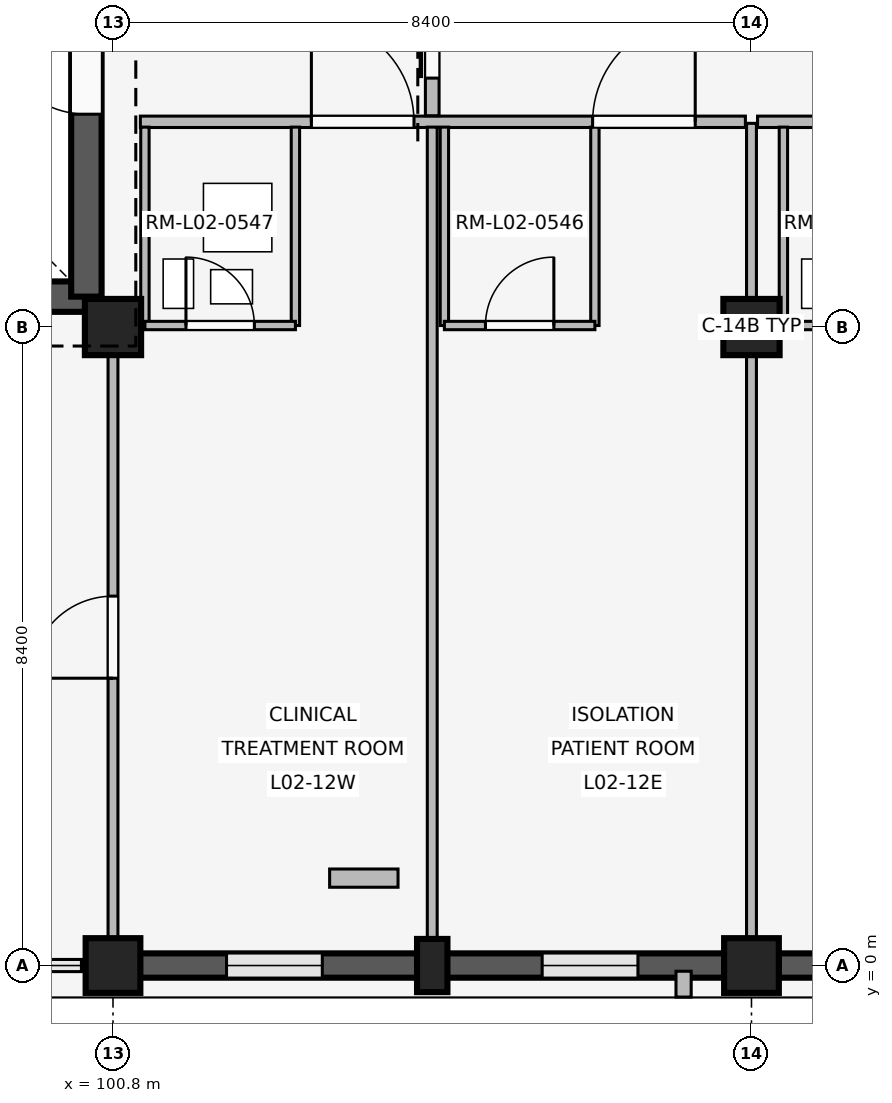
"""IFC4 building model, lengths in metres.
Left out: names, types, materials, properties, quantities, classifications, styles, units other than length and angle.
Written with IfcOpenShell. Run it as: python <this file> out.ifc"""

import sys

from ifc_helpers import new_model, si_unit, direction, frame, frame_2d, origin, origin_2d, place, context, subcontext, project, spatial, rectangle, extrude, element, fill, save


model = new_model("IFC4")
c1 = context("Model", 3, precision=1e-05, world=origin(), true_north=direction((0.0, 1.0)))
c2 = subcontext(c1, "Body", "Model", "MODEL_VIEW")
j1 = project(units=[si_unit("LENGTHUNIT", "METRE"), si_unit("PLANEANGLEUNIT", "RADIAN")], contexts=[c1])
p1 = place(None, origin())
s1 = spatial("IfcSite", under=j1, at=p1, CompositionType="ELEMENT")
p2 = place(p1, origin())
s2 = spatial("IfcBuilding", under=s1, at=p2, CompositionType="ELEMENT")
p3 = place(p2, frame((0.0, 0.0, 8.1)))
s3 = spatial("IfcBuildingStorey", under=s2, at=p3, CompositionType="ELEMENT", Elevation=8.1)
p4 = place(p3, frame((100.8, 0.0, 0.0), z_axis=(0.0, 0.0, 1.0), x_axis=(1.0, 0.0, 0.0)))
e1 = element("IfcColumn", 1, at=p4, inside=s3, PredefinedType="COLUMN", context=c2, shape_type="SweptSolid", body=[
    extrude(rectangle(XDim=0.72, YDim=0.72, at=origin_2d()), origin(), (0.0, 0.0, 1.0), 4.8),
])
p5 = place(p3, frame((100.8, 8.4, 0.0), z_axis=(0.0, 0.0, 1.0), x_axis=(1.0, 0.0, 0.0)))
e2 = element("IfcColumn", 2, at=p5, inside=s3, PredefinedType="COLUMN", context=c2, shape_type="SweptSolid", body=[
    extrude(rectangle(XDim=0.74, YDim=0.74, at=origin_2d()), origin(), (0.0, 0.0, 1.0), 4.8),
])
p6 = place(p3, frame((109.2, 0.0, 0.0), z_axis=(0.0, 0.0, 1.0), x_axis=(1.0, 0.0, 0.0)))
e3 = element("IfcColumn", 3, at=p6, inside=s3, PredefinedType="COLUMN", context=c2, shape_type="SweptSolid", body=[
    extrude(rectangle(XDim=0.72, YDim=0.72, at=origin_2d()), origin(), (0.0, 0.0, 1.0), 4.8),
])
p7 = place(p3, frame((109.2, 8.4, 0.0), z_axis=(0.0, 0.0, 1.0), x_axis=(1.0, 0.0, 0.0)))
e4 = element("IfcColumn", 4, at=p7, inside=s3, PredefinedType="COLUMN", context=c2, shape_type="SweptSolid", body=[
    extrude(rectangle(XDim=0.74, YDim=0.74, at=origin_2d()), origin(), (0.0, 0.0, 1.0), 4.8),
])
p8 = place(p3, frame((105.0, 0.0, 0.0), z_axis=(0.0, 0.0, 1.0), x_axis=(1.0, 0.0, 0.0)))
e5 = element("IfcColumn", 5, at=p8, inside=s3, PredefinedType="PILASTER", context=c2, shape_type="SweptSolid", body=[
    extrude(rectangle(XDim=0.4, YDim=0.7, at=origin_2d()), origin(), (0.0, 0.0, 1.0), 4.8),
])
p9 = place(p3, frame((108.845, 0.0, 0.0), z_axis=(0.0, 0.0, 1.0), x_axis=(-1.0, 0.0, 0.0)))
e6 = element("IfcWall", 6, at=p9, inside=s3, PredefinedType="SOLIDWALL", context=c2, shape_type="SweptSolid", body=[
    extrude(rectangle(XDim=7.69, YDim=0.32, at=frame_2d((3.845, 0.0))), origin(), (0.0, 0.0, 1.0), 3.86),
])
p10 = place(p9, frame((1.139, 0.0, 0.85)))
e7 = element("IfcOpeningElement", 7, at=p10, cuts=e6, PredefinedType="OPENING", context=c2, shape_type="SweptSolid", body=[
    extrude(rectangle(XDim=1.26, YDim=1.52, at=frame_2d((0.63, 0.76))), frame((0.0, 0.17, 0.0), z_axis=(0.0, -1.0, 0.0), x_axis=(1.0, 0.0, 0.0)), (0.0, 0.0, 1.0), 0.34),
])
p11 = place(p9, frame((5.291, 0.0, 0.85)))
e8 = element("IfcOpeningElement", 8, at=p11, cuts=e6, PredefinedType="OPENING", context=c2, shape_type="SweptSolid", body=[
    extrude(rectangle(XDim=1.26, YDim=1.52, at=frame_2d((0.63, 0.76))), frame((0.0, 0.17, 0.0), z_axis=(0.0, -1.0, 0.0), x_axis=(1.0, 0.0, 0.0)), (0.0, 0.0, 1.0), 0.34),
])
p12 = place(p3, frame((108.307, -0.075, 0.0), z_axis=(0.0, 0.0, 1.0), x_axis=(0.0, -1.0, 0.0)))
e9 = element("IfcWall", 9, at=p12, inside=s3, PredefinedType="ELEMENTEDWALL", context=c2, shape_type="SweptSolid", body=[
    extrude(rectangle(XDim=0.34, YDim=0.2, at=frame_2d((0.17, 0.0))), origin(), (0.0, 0.0, 1.0), 3.84),
])
p13 = place(p3, frame((117.245, 0.0, 0.0), z_axis=(0.0, 0.0, 1.0), x_axis=(-1.0, 0.0, 0.0)))
e10 = element("IfcWall", 10, at=p13, inside=s3, PredefinedType="SOLIDWALL", context=c2, shape_type="SweptSolid", body=[
    extrude(rectangle(XDim=7.69, YDim=0.32, at=frame_2d((3.845, 0.0))), origin(), (0.0, 0.0, 1.0), 3.86),
])
p14 = place(p13, frame((1.189, 0.0, 0.85)))
e11 = element("IfcOpeningElement", 11, at=p14, cuts=e10, PredefinedType="OPENING", context=c2, shape_type="SweptSolid", body=[
    extrude(rectangle(XDim=1.16, YDim=1.48, at=frame_2d((0.58, 0.74))), frame((0.0, 0.17, 0.0), z_axis=(0.0, -1.0, 0.0), x_axis=(1.0, 0.0, 0.0)), (0.0, 0.0, 1.0), 0.34),
])
p15 = place(p13, frame((5.341, 0.0, 0.85)))
e12 = element("IfcOpeningElement", 12, at=p15, cuts=e10, PredefinedType="OPENING", context=c2, shape_type="SweptSolid", body=[
    extrude(rectangle(XDim=1.16, YDim=1.48, at=frame_2d((0.58, 0.74))), frame((0.0, 0.17, 0.0), z_axis=(0.0, -1.0, 0.0), x_axis=(1.0, 0.0, 0.0)), (0.0, 0.0, 1.0), 0.34),
])
p16 = place(p3, frame((92.95, 8.8, 0.0), z_axis=(0.0, 0.0, 1.0), x_axis=(1.0, 0.0, 0.0)))
e13 = element("IfcWall", 13, at=p16, inside=s3, PredefinedType="SHEAR", context=c2, shape_type="SweptSolid", body=[
    extrude(rectangle(XDim=7.5, YDim=0.4, at=frame_2d((3.75, 0.0))), origin(), (0.0, 0.0, 1.0), 4.52),
])
p17 = place(p16, frame((4.85, 0.0, 0.0)))
e14 = element("IfcOpeningElement", 14, at=p17, cuts=e13, PredefinedType="OPENING", context=c2, shape_type="SweptSolid", body=[
    extrude(rectangle(XDim=1.2, YDim=2.2, at=frame_2d((0.6, 1.1))), frame((0.0, 0.21, 0.0), z_axis=(0.0, -1.0, 0.0), x_axis=(1.0, 0.0, 0.0)), (0.0, 0.0, 1.0), 0.42),
])
p18 = place(p3, frame((100.45, 8.8, 0.0), z_axis=(0.0, 0.0, 1.0), x_axis=(0.0, 1.0, 0.0)))
e15 = element("IfcWall", 15, at=p18, inside=s3, PredefinedType="SHEAR", context=c2, shape_type="SweptSolid", body=[
    extrude(rectangle(XDim=7.55, YDim=0.4, at=frame_2d((3.775, 0.0))), origin(), (0.0, 0.0, 1.0), 4.52),
])
p19 = place(p18, frame((2.4, 0.0, 0.0)))
e16 = element("IfcOpeningElement", 16, at=p19, cuts=e15, PredefinedType="OPENING", context=c2, shape_type="SweptSolid", body=[
    extrude(rectangle(XDim=1.2, YDim=2.2, at=frame_2d((0.6, 1.1))), frame((0.0, 0.21, 0.0), z_axis=(0.0, -1.0, 0.0), x_axis=(1.0, 0.0, 0.0)), (0.0, 0.0, 1.0), 0.42),
])
p20 = place(p3, frame((100.8, 0.14, 0.0), z_axis=(0.0, 0.0, 1.0), x_axis=(0.0, 1.0, 0.0)))
e17 = element("IfcWall", 17, at=p20, inside=s3, PredefinedType="PARTITIONING", context=c2, shape_type="SweptSolid", body=[
    extrude(rectangle(XDim=8.21, YDim=0.13, at=frame_2d((4.105, 0.0))), origin(), (0.0, 0.0, 1.0), 3.84),
])
p21 = place(p20, frame((3.64, 0.0, 0.0)))
e18 = element("IfcOpeningElement", 18, at=p21, cuts=e17, PredefinedType="OPENING", context=c2, shape_type="SweptSolid", body=[
    extrude(rectangle(XDim=1.08, YDim=2.15, at=frame_2d((0.54, 1.075))), frame((0.0, 0.075, 0.0), z_axis=(0.0, -1.0, 0.0), x_axis=(1.0, 0.0, 0.0)), (0.0, 0.0, 1.0), 0.15),
])
p22 = place(p3, frame((101.16, 11.1, 0.0), z_axis=(0.0, 0.0, 1.0), x_axis=(1.0, 0.0, 0.0)))
e19 = element("IfcWall", 19, at=p22, inside=s3, PredefinedType="PARTITIONING", context=c2, shape_type="SweptSolid", body=[
    extrude(rectangle(XDim=7.96, YDim=0.15, at=frame_2d((3.98, 0.0))), origin(), (0.0, 0.0, 1.0), 3.84),
])
p23 = place(p22, frame((2.25, 0.0, 0.0)))
e20 = element("IfcOpeningElement", 20, at=p23, cuts=e19, PredefinedType="OPENING", context=c2, shape_type="SweptSolid", body=[
    extrude(rectangle(XDim=1.35, YDim=2.25, at=frame_2d((0.675, 1.125))), frame((0.0, 0.085, 0.0), z_axis=(0.0, -1.0, 0.0), x_axis=(1.0, 0.0, 0.0)), (0.0, 0.0, 1.0), 0.17),
])
p24 = place(p22, frame((5.95, 0.0, 0.0)))
e21 = element("IfcOpeningElement", 21, at=p24, cuts=e19, PredefinedType="OPENING", context=c2, shape_type="SweptSolid", body=[
    extrude(rectangle(XDim=1.35, YDim=2.25, at=frame_2d((0.675, 1.125))), frame((0.0, 0.085, 0.0), z_axis=(0.0, -1.0, 0.0), x_axis=(1.0, 0.0, 0.0)), (0.0, 0.0, 1.0), 0.17),
])
p25 = place(p3, frame((105.0, 0.1, 0.0), z_axis=(0.0, 0.0, 1.0), x_axis=(0.0, 1.0, 0.0)))
e22 = element("IfcWall", 22, at=p25, inside=s3, PredefinedType="PARTITIONING", context=c2, shape_type="SweptSolid", body=[
    extrude(rectangle(XDim=10.93, YDim=0.13, at=frame_2d((5.465, 0.0))), origin(), (0.0, 0.0, 1.0), 3.84),
])
for number, where, z_axis, x_axis in (
    (23, (101.22, 8.42, 0.0), (0.0, 0.0, 1.0), (0.0, 1.0, 0.0)),
    (24, (103.2, 8.42, 0.0), (0.0, 0.0, 1.0), (0.0, 1.0, 0.0)),
):
    element("IfcWall", number, at=place(p3, frame(where, z_axis=z_axis, x_axis=x_axis)), inside=s3, PredefinedType="PARTITIONING", context=c2, shape_type="SweptSolid", body=[
        extrude(rectangle(XDim=2.61, YDim=0.11, at=frame_2d((1.305, 0.0))), origin(), (0.0, 0.0, 1.0), 3.84),
    ])
p26 = place(p3, frame((101.22, 8.42, 0.0), z_axis=(0.0, 0.0, 1.0), x_axis=(1.0, 0.0, 0.0)))
e25 = element("IfcWall", 25, at=p26, inside=s3, PredefinedType="PARTITIONING", context=c2, shape_type="SweptSolid", body=[
    extrude(rectangle(XDim=1.98, YDim=0.11, at=frame_2d((0.99, 0.0))), origin(), (0.0, 0.0, 1.0), 3.84),
])
p27 = place(p26, frame((0.54, 0.0, 0.0)))
e26 = element("IfcOpeningElement", 26, at=p27, cuts=e25, PredefinedType="OPENING", context=c2, shape_type="SweptSolid", body=[
    extrude(rectangle(XDim=0.9, YDim=2.1, at=frame_2d((0.45, 1.05))), frame((0.0, 0.065, 0.0), z_axis=(0.0, -1.0, 0.0), x_axis=(1.0, 0.0, 0.0)), (0.0, 0.0, 1.0), 0.13),
])
for number, where, z_axis, x_axis in (
    (27, (105.16, 8.42, 0.0), (0.0, 0.0, 1.0), (0.0, 1.0, 0.0)),
    (28, (107.14, 8.42, 0.0), (0.0, 0.0, 1.0), (0.0, 1.0, 0.0)),
):
    element("IfcWall", number, at=place(p3, frame(where, z_axis=z_axis, x_axis=x_axis)), inside=s3, PredefinedType="PARTITIONING", context=c2, shape_type="SweptSolid", body=[
        extrude(rectangle(XDim=2.61, YDim=0.11, at=frame_2d((1.305, 0.0))), origin(), (0.0, 0.0, 1.0), 3.84),
    ])
p28 = place(p3, frame((105.16, 8.42, 0.0), z_axis=(0.0, 0.0, 1.0), x_axis=(1.0, 0.0, 0.0)))
e29 = element("IfcWall", 29, at=p28, inside=s3, PredefinedType="PARTITIONING", context=c2, shape_type="SweptSolid", body=[
    extrude(rectangle(XDim=1.98, YDim=0.11, at=frame_2d((0.99, 0.0))), origin(), (0.0, 0.0, 1.0), 3.84),
])
p29 = place(p28, frame((0.54, 0.0, 0.0)))
e30 = element("IfcOpeningElement", 30, at=p29, cuts=e29, PredefinedType="OPENING", context=c2, shape_type="SweptSolid", body=[
    extrude(rectangle(XDim=0.9, YDim=2.1, at=frame_2d((0.45, 1.05))), frame((0.0, 0.065, 0.0), z_axis=(0.0, -1.0, 0.0), x_axis=(1.0, 0.0, 0.0)), (0.0, 0.0, 1.0), 0.13),
])
p30 = place(p3, frame((103.65, 1.15, 0.0), z_axis=(0.0, 0.0, 1.0), x_axis=(1.0, 0.0, 0.0)))
e31 = element("IfcWall", 31, at=p30, inside=s3, PredefinedType="PLUMBINGWALL", context=c2, shape_type="SweptSolid", body=[
    extrude(rectangle(XDim=0.9, YDim=0.24, at=frame_2d((0.45, 0.0))), origin(), (0.0, 0.0, 1.0), 3.84),
])
p31 = place(p3, frame((105.0, 11.18, 0.0), z_axis=(0.0, 0.0, 1.0), x_axis=(0.0, 1.0, 0.0)))
e32 = element("IfcWall", 32, at=p31, inside=s3, PredefinedType="PARTITIONING", context=c2, shape_type="SweptSolid", body=[
    extrude(rectangle(XDim=2.84, YDim=0.18, at=frame_2d((1.42, 0.0))), origin(), (0.0, 0.0, 1.0), 3.84),
])
p32 = place(p31, frame((0.495, 0.0, 0.0)))
e33 = element("IfcOpeningElement", 33, at=p32, cuts=e32, PredefinedType="OPENING", context=c2, shape_type="SweptSolid", body=[
    extrude(rectangle(XDim=1.85, YDim=2.3, at=frame_2d((0.925, 1.15))), frame((0.0, 0.1, 0.0), z_axis=(0.0, -1.0, 0.0), x_axis=(1.0, 0.0, 0.0)), (0.0, 0.0, 1.0), 0.2),
])
p33 = place(p3, frame((109.2, 0.14, 0.0), z_axis=(0.0, 0.0, 1.0), x_axis=(0.0, 1.0, 0.0)))
e34 = element("IfcWall", 34, at=p33, inside=s3, PredefinedType="PARTITIONING", context=c2, shape_type="SweptSolid", body=[
    extrude(rectangle(XDim=10.94, YDim=0.13, at=frame_2d((5.47, 0.0))), origin(), (0.0, 0.0, 1.0), 3.84),
])
p34 = place(p3, frame((109.28, 11.1, 0.0), z_axis=(0.0, 0.0, 1.0), x_axis=(1.0, 0.0, 0.0)))
e35 = element("IfcWall", 35, at=p34, inside=s3, PredefinedType="PARTITIONING", context=c2, shape_type="SweptSolid", body=[
    extrude(rectangle(XDim=8.24, YDim=0.15, at=frame_2d((4.12, 0.0))), origin(), (0.0, 0.0, 1.0), 3.84),
])
p35 = place(p34, frame((2.53, 0.0, 0.0)))
e36 = element("IfcOpeningElement", 36, at=p35, cuts=e35, PredefinedType="OPENING", context=c2, shape_type="SweptSolid", body=[
    extrude(rectangle(XDim=1.3, YDim=2.25, at=frame_2d((0.65, 1.125))), frame((0.0, 0.085, 0.0), z_axis=(0.0, -1.0, 0.0), x_axis=(1.0, 0.0, 0.0)), (0.0, 0.0, 1.0), 0.17),
])
p36 = place(p34, frame((6.23, 0.0, 0.0)))
e37 = element("IfcOpeningElement", 37, at=p36, cuts=e35, PredefinedType="OPENING", context=c2, shape_type="SweptSolid", body=[
    extrude(rectangle(XDim=1.3, YDim=2.25, at=frame_2d((0.65, 1.125))), frame((0.0, 0.085, 0.0), z_axis=(0.0, -1.0, 0.0), x_axis=(1.0, 0.0, 0.0)), (0.0, 0.0, 1.0), 0.17),
])
p37 = place(p3, frame((109.62, 8.42, 0.0), z_axis=(0.0, 0.0, 1.0), x_axis=(0.0, 1.0, 0.0)))
e38 = element("IfcWall", 38, at=p37, inside=s3, PredefinedType="PARTITIONING", context=c2, shape_type="SweptSolid", body=[
    extrude(rectangle(XDim=2.61, YDim=0.11, at=frame_2d((1.305, 0.0))), origin(), (0.0, 0.0, 1.0), 3.84),
])
p38 = place(p3, frame((109.62, 8.42, 0.0), z_axis=(0.0, 0.0, 1.0), x_axis=(1.0, 0.0, 0.0)))
e39 = element("IfcWall", 39, at=p38, inside=s3, PredefinedType="PARTITIONING", context=c2, shape_type="SweptSolid", body=[
    extrude(rectangle(XDim=1.98, YDim=0.11, at=frame_2d((0.99, 0.0))), origin(), (0.0, 0.0, 1.0), 3.84),
])
p39 = place(p38, frame((0.54, 0.0, 0.0)))
e40 = element("IfcOpeningElement", 40, at=p39, cuts=e39, PredefinedType="OPENING", context=c2, shape_type="SweptSolid", body=[
    extrude(rectangle(XDim=0.9, YDim=2.1, at=frame_2d((0.45, 1.05))), frame((0.0, 0.065, 0.0), z_axis=(0.0, -1.0, 0.0), x_axis=(1.0, 0.0, 0.0)), (0.0, 0.0, 1.0), 0.13),
])
p40 = place(p10, origin())
e41 = element("IfcWindow", 41, at=p40, inside=s3, PartitioningType="SINGLE_PANEL", PredefinedType="WINDOW", context=c2, shape_type="SweptSolid", body=[
    extrude(rectangle(XDim=1.26, YDim=1.52, at=frame_2d((0.63, 0.76))), frame((0.0, 0.03, 0.0), z_axis=(0.0, -1.0, 0.0), x_axis=(1.0, 0.0, 0.0)), (0.0, 0.0, 1.0), 0.06),
])
fill(e7, e41)
p41 = place(p11, origin())
e42 = element("IfcWindow", 42, at=p41, inside=s3, PartitioningType="SINGLE_PANEL", PredefinedType="WINDOW", context=c2, shape_type="SweptSolid", body=[
    extrude(rectangle(XDim=1.26, YDim=1.52, at=frame_2d((0.63, 0.76))), frame((0.0, 0.03, 0.0), z_axis=(0.0, -1.0, 0.0), x_axis=(1.0, 0.0, 0.0)), (0.0, 0.0, 1.0), 0.06),
])
fill(e8, e42)
p42 = place(p19, origin())
e43 = element("IfcDoor", 43, at=p42, inside=s3, OperationType="SINGLE_SWING_RIGHT", PredefinedType="DOOR", context=c2, shape_type="SweptSolid", body=[
    extrude(rectangle(XDim=1.2, YDim=2.2, at=frame_2d((0.6, 1.1))), frame((0.0, 0.025, 0.0), z_axis=(0.0, -1.0, 0.0), x_axis=(1.0, 0.0, 0.0)), (0.0, 0.0, 1.0), 0.05),
])
fill(e16, e43)
p43 = place(p21, origin())
e44 = element("IfcDoor", 44, at=p43, inside=s3, OperationType="SINGLE_SWING_LEFT", PredefinedType="DOOR", context=c2, shape_type="SweptSolid", body=[
    extrude(rectangle(XDim=1.08, YDim=2.15, at=frame_2d((0.54, 1.075))), frame((0.0, 0.025, 0.0), z_axis=(0.0, -1.0, 0.0), x_axis=(1.0, 0.0, 0.0)), (0.0, 0.0, 1.0), 0.05),
])
fill(e18, e44)
p44 = place(p23, origin())
e45 = element("IfcDoor", 45, at=p44, inside=s3, OperationType="SINGLE_SWING_LEFT", PredefinedType="DOOR", context=c2, shape_type="SweptSolid", body=[
    extrude(rectangle(XDim=1.35, YDim=2.25, at=frame_2d((0.675, 1.125))), frame((0.0, 0.025, 0.0), z_axis=(0.0, -1.0, 0.0), x_axis=(1.0, 0.0, 0.0)), (0.0, 0.0, 1.0), 0.05),
])
fill(e20, e45)
p45 = place(p24, origin())
e46 = element("IfcDoor", 46, at=p45, inside=s3, OperationType="SINGLE_SWING_RIGHT", PredefinedType="DOOR", context=c2, shape_type="SweptSolid", body=[
    extrude(rectangle(XDim=1.35, YDim=2.25, at=frame_2d((0.675, 1.125))), frame((0.0, 0.025, 0.0), z_axis=(0.0, -1.0, 0.0), x_axis=(1.0, 0.0, 0.0)), (0.0, 0.0, 1.0), 0.05),
])
fill(e21, e46)
p46 = place(p27, origin())
e47 = element("IfcDoor", 47, at=p46, inside=s3, OperationType="SINGLE_SWING_LEFT", PredefinedType="DOOR", context=c2, shape_type="SweptSolid", body=[
    extrude(rectangle(XDim=0.9, YDim=2.1, at=frame_2d((0.45, 1.05))), frame((0.0, 0.025, 0.0), z_axis=(0.0, -1.0, 0.0), x_axis=(1.0, 0.0, 0.0)), (0.0, 0.0, 1.0), 0.05),
])
fill(e26, e47)
p47 = place(p29, origin())
e48 = element("IfcDoor", 48, at=p47, inside=s3, OperationType="SINGLE_SWING_RIGHT", PredefinedType="DOOR", context=c2, shape_type="SweptSolid", body=[
    extrude(rectangle(XDim=0.9, YDim=2.1, at=frame_2d((0.45, 1.05))), frame((0.0, 0.025, 0.0), z_axis=(0.0, -1.0, 0.0), x_axis=(1.0, 0.0, 0.0)), (0.0, 0.0, 1.0), 0.05),
])
fill(e30, e48)
p48 = place(p32, origin())
e49 = element("IfcDoor", 49, at=p48, inside=s3, OperationType="SLIDING_TO_LEFT", PredefinedType="DOOR", context=c2, shape_type="SweptSolid", body=[
    extrude(rectangle(XDim=1.85, YDim=2.3, at=frame_2d((0.925, 1.15))), frame((0.0, 0.025, 0.0), z_axis=(0.0, -1.0, 0.0), x_axis=(1.0, 0.0, 0.0)), (0.0, 0.0, 1.0), 0.05),
])
fill(e33, e49)
save(model, sys.argv[1])
